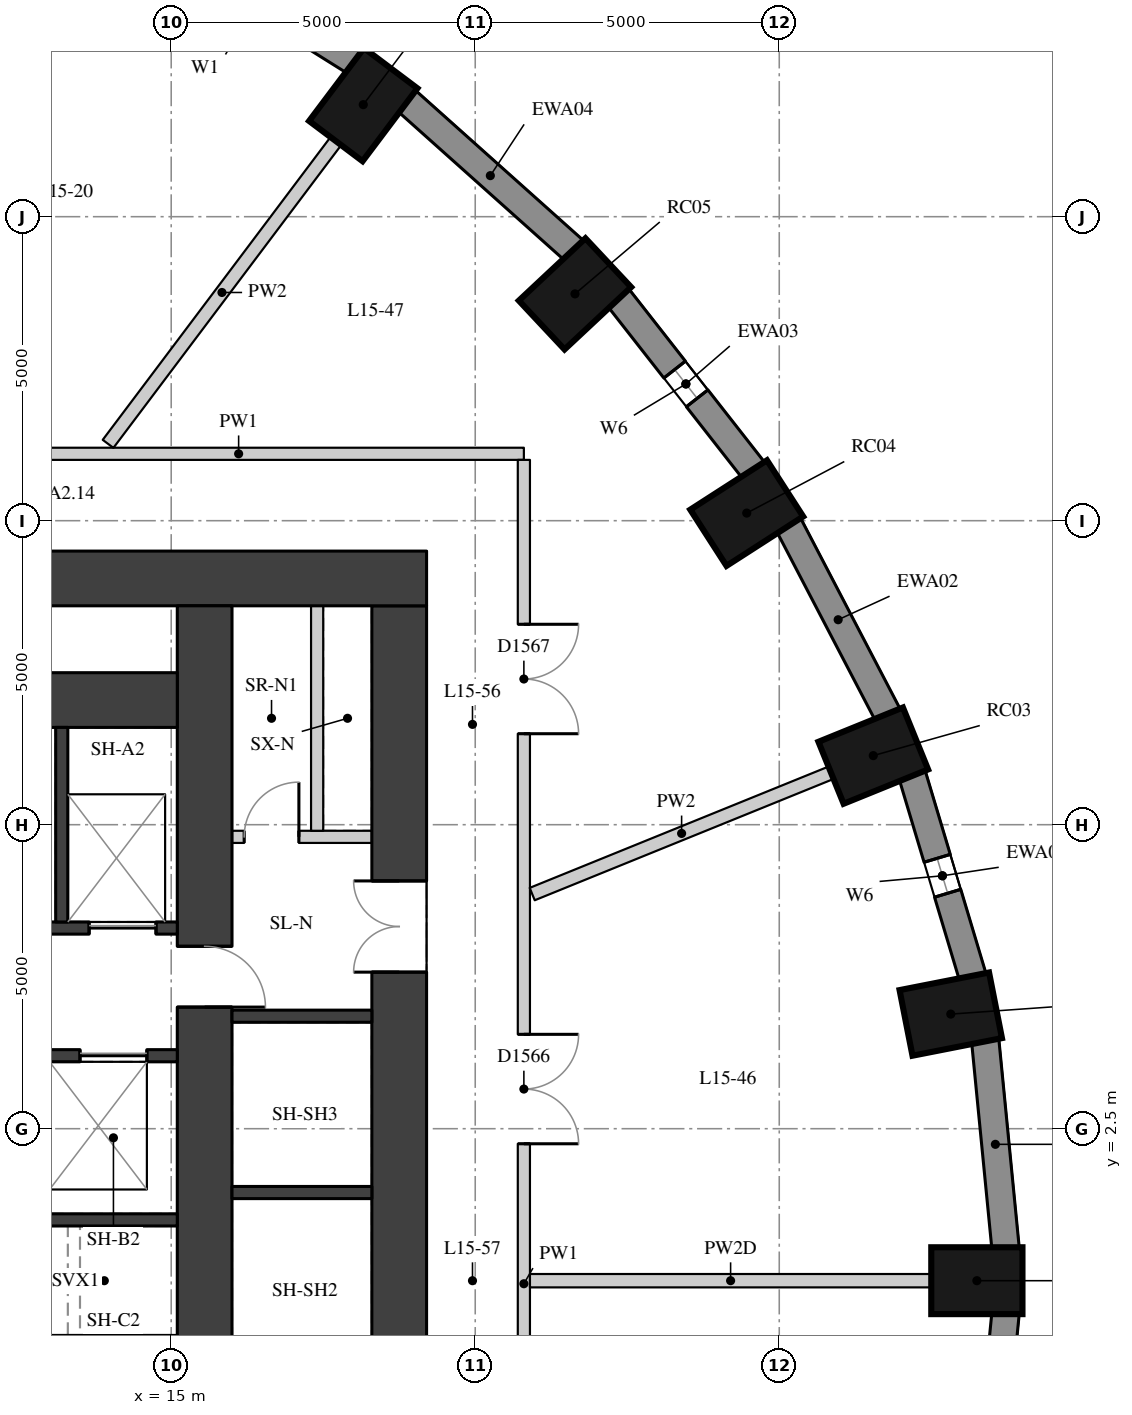
"""IFC4 building model, lengths in metres.
Left out: names, types, materials, properties, quantities, classifications, styles, units other than length and angle.
Written with IfcOpenShell. Run it as: python <this file> out.ifc"""

import sys

from ifc_helpers import new_model, si_unit, direction, frame, frame_2d, origin, origin_2d, place, context, subcontext, project, spatial, rectangle, extrude, element, fill, save


model = new_model("IFC4")
c1 = context("Model", 3, precision=1e-05, world=origin(), true_north=direction((0.0, 1.0)))
c2 = subcontext(c1, "Body", "Model", "MODEL_VIEW")
j1 = project(units=[si_unit("LENGTHUNIT", "METRE"), si_unit("PLANEANGLEUNIT", "RADIAN")], contexts=[c1])
p1 = place(None, origin())
s1 = spatial("IfcSite", under=j1, at=p1, CompositionType="ELEMENT")
p2 = place(p1, origin())
s2 = spatial("IfcBuilding", under=s1, at=p2, CompositionType="ELEMENT")
p3 = place(p2, frame((0.0, 0.0, 58.0)))
s3 = spatial("IfcBuildingStorey", under=s2, at=p3, CompositionType="ELEMENT", Elevation=58.0)
for number, where, z_axis, x_axis in (
    (1, (28.25, 0.0, 0.0), (0.0, 0.0, 1.0), (1.0, 0.0, 0.0)),
    (2, (27.821, 4.385, 0.0), (0.0, 0.0, 1.0), (0.981, 0.193, 0.0)),
    (3, (26.546, 8.636, 0.0), (0.0, 0.0, 1.0), (0.927, 0.376, 0.0)),
    (4, (24.465, 12.625, 0.0), (0.0, 0.0, 1.0), (0.841, 0.541, 0.0)),
    (5, (21.641, 16.23, 0.0), (0.0, 0.0, 1.0), (0.73, 0.683, 0.0)),
    (6, (18.159, 19.343, 0.0), (0.0, 0.0, 1.0), (0.601, 0.799, 0.0)),
):
    element("IfcColumn", number, at=place(p3, frame(where, z_axis=z_axis, x_axis=x_axis)), inside=s3, PredefinedType="COLUMN", context=c2, shape_type="SweptSolid", body=[
        extrude(rectangle(XDim=1.5, YDim=1.1, at=origin_2d()), origin(), (0.0, 0.0, 1.0), 3.3),
    ])
p4 = place(p3, frame((28.722, 0.53, 0.0), z_axis=(0.0, 0.0, 1.0), x_axis=(-0.097389581596, 0.995246336038, 0.0)))
e7 = element("IfcWall", 7, at=p4, inside=s3, PredefinedType="SOLIDWALL", context=c2, shape_type="SweptSolid", body=[
    extrude(rectangle(XDim=3.442, YDim=0.45, at=frame_2d((1.721, 0.0))), origin(), (0.0, 0.0, 1.0), 3.02),
])
p5 = place(p3, frame((28.182, 4.996, 0.0), z_axis=(0.0, 0.0, 1.0), x_axis=(-0.287064133733, 0.957911364963, 0.0)))
e8 = element("IfcWall", 8, at=p5, inside=s3, PredefinedType="SOLIDWALL", context=c2, shape_type="SweptSolid", body=[
    extrude(rectangle(XDim=3.473, YDim=0.45, at=frame_2d((1.737, 0.0))), origin(), (0.0, 0.0, 1.0), 3.02),
])
p6 = place(p5, frame((1.437, 0.0, 0.4)))
e9 = element("IfcOpeningElement", 9, at=p6, cuts=e8, PredefinedType="OPENING", context=c2, shape_type="SweptSolid", body=[
    extrude(rectangle(XDim=0.6, YDim=1.75, at=frame_2d((0.3, 0.875))), frame((0.0, 0.235, 0.0), z_axis=(0.0, -1.0, 0.0), x_axis=(1.0, 0.0, 0.0)), (0.0, 0.0, 1.0), 0.47),
])
p7 = place(p3, frame((26.786, 9.305, 0.0), z_axis=(0.0, 0.0, 1.0), x_axis=(-0.462492775226, 0.886623050041, 0.0)))
e10 = element("IfcWall", 10, at=p7, inside=s3, PredefinedType="SOLIDWALL", context=c2, shape_type="SweptSolid", body=[
    extrude(rectangle(XDim=3.532, YDim=0.45, at=frame_2d((1.766, 0.0))), origin(), (0.0, 0.0, 1.0), 3.02),
])
p8 = place(p3, frame((24.578, 13.328, 0.0), z_axis=(0.0, 0.0, 1.0), x_axis=(-0.616661975264, 0.787228053529, 0.0)))
e11 = element("IfcWall", 11, at=p8, inside=s3, PredefinedType="SOLIDWALL", context=c2, shape_type="SweptSolid", body=[
    extrude(rectangle(XDim=3.61, YDim=0.45, at=frame_2d((1.805, 0.0))), origin(), (0.0, 0.0, 1.0), 3.02),
])
p9 = place(p8, frame((1.505, 0.0, 0.4)))
e12 = element("IfcOpeningElement", 12, at=p9, cuts=e11, PredefinedType="OPENING", context=c2, shape_type="SweptSolid", body=[
    extrude(rectangle(XDim=0.6, YDim=1.75, at=frame_2d((0.3, 0.875))), frame((0.0, 0.235, 0.0), z_axis=(0.0, -1.0, 0.0), x_axis=(1.0, 0.0, 0.0)), (0.0, 0.0, 1.0), 0.47),
])
p10 = place(p3, frame((21.627, 16.943, 0.0), z_axis=(0.0, 0.0, 1.0), x_axis=(-0.745526233716, 0.66647628228, 0.0)))
e13 = element("IfcWall", 13, at=p10, inside=s3, PredefinedType="SOLIDWALL", context=c2, shape_type="SweptSolid", body=[
    extrude(rectangle(XDim=3.697, YDim=0.45, at=frame_2d((1.848, 0.0))), origin(), (0.0, 0.0, 1.0), 3.02),
])
p11 = place(p3, frame((18.023, 20.044, 0.0), z_axis=(0.0, 0.0, 1.0), x_axis=(-0.847635480093, 0.530579016629, 0.0)))
e14 = element("IfcWall", 14, at=p11, inside=s3, PredefinedType="SOLIDWALL", context=c2, shape_type="SweptSolid", body=[
    extrude(rectangle(XDim=3.782, YDim=0.45, at=frame_2d((1.891, 0.0))), origin(), (0.0, 0.0, 1.0), 3.02),
])
p12 = place(p11, frame((0.791, 0.0, 0.4)))
e15 = element("IfcOpeningElement", 15, at=p12, cuts=e14, PredefinedType="OPENING", context=c2, shape_type="SweptSolid", body=[
    extrude(rectangle(XDim=2.2, YDim=1.75, at=frame_2d((1.1, 0.875))), frame((0.0, 0.235, 0.0), z_axis=(0.0, -1.0, 0.0), x_axis=(1.0, 0.0, 0.0)), (0.0, 0.0, 1.0), 0.47),
])
p13 = place(p3, frame((28.387, -3.956, 0.0), z_axis=(0.0, 0.0, 1.0), x_axis=(0.097389581596, 0.995246336038, 0.0)))
e16 = element("IfcWall", 16, at=p13, inside=s3, PredefinedType="SOLIDWALL", context=c2, shape_type="SweptSolid", body=[
    extrude(rectangle(XDim=3.442, YDim=0.45, at=frame_2d((1.721, 0.0))), origin(), (0.0, 0.0, 1.0), 3.02),
])
p14 = place(p13, frame((1.421, 0.0, 0.4)))
e17 = element("IfcOpeningElement", 17, at=p14, cuts=e16, PredefinedType="OPENING", context=c2, shape_type="SweptSolid", body=[
    extrude(rectangle(XDim=0.6, YDim=1.75, at=frame_2d((0.3, 0.875))), frame((0.0, 0.235, 0.0), z_axis=(0.0, -1.0, 0.0), x_axis=(1.0, 0.0, 0.0)), (0.0, 0.0, 1.0), 0.47),
])
p15 = place(p3, frame((18.75, -11.1, 0.0), z_axis=(0.0, 0.0, 1.0), x_axis=(0.0, 1.0, 0.0)))
e18 = element("IfcWall", 18, at=p15, inside=s3, PredefinedType="SHEAR", context=c2, shape_type="SweptSolid", body=[
    extrude(rectangle(XDim=22.2, YDim=0.9, at=frame_2d((11.1, 0.0))), origin(), (0.0, 0.0, 1.0), 3.02),
])
p16 = place(p15, frame((16.175, 0.0, 0.0)))
e19 = element("IfcOpeningElement", 19, at=p16, cuts=e18, PredefinedType="OPENING", context=c2, shape_type="SweptSolid", body=[
    extrude(rectangle(XDim=1.5, YDim=2.1, at=frame_2d((0.75, 1.05))), frame((0.0, 0.46, 0.0), z_axis=(0.0, -1.0, 0.0), x_axis=(1.0, 0.0, 0.0)), (0.0, 0.0, 1.0), 0.92),
])
p17 = place(p15, frame((5.025, 0.0, 0.0)))
e20 = element("IfcOpeningElement", 20, at=p17, cuts=e18, PredefinedType="OPENING", context=c2, shape_type="SweptSolid", body=[
    extrude(rectangle(XDim=1.5, YDim=2.1, at=frame_2d((0.75, 1.05))), frame((0.0, 0.46, 0.0), z_axis=(0.0, -1.0, 0.0), x_axis=(1.0, 0.0, 0.0)), (0.0, 0.0, 1.0), 0.92),
])
p18 = place(p3, frame((4.0, 11.55, 0.0), z_axis=(0.0, 0.0, 1.0), x_axis=(1.0, 0.0, 0.0)))
e21 = element("IfcWall", 21, at=p18, inside=s3, PredefinedType="SHEAR", context=c2, shape_type="SweptSolid", body=[
    extrude(rectangle(XDim=15.2, YDim=0.9, at=frame_2d((7.6, 0.0))), origin(), (0.0, 0.0, 1.0), 3.02),
])
p19 = place(p3, frame((15.55, -11.1, 0.0), z_axis=(0.0, 0.0, 1.0), x_axis=(0.0, 1.0, 0.0)))
e22 = element("IfcWall", 22, at=p19, inside=s3, PredefinedType="SHEAR", context=c2, shape_type="SweptSolid", body=[
    extrude(rectangle(XDim=22.2, YDim=0.9, at=frame_2d((11.1, 0.0))), origin(), (0.0, 0.0, 1.0), 3.02),
])
p20 = place(p19, frame((15.6, 0.0, 0.0)))
e23 = element("IfcOpeningElement", 23, at=p20, cuts=e22, PredefinedType="OPENING", context=c2, shape_type="SweptSolid", body=[
    extrude(rectangle(XDim=1.0, YDim=2.1, at=frame_2d((0.5, 1.05))), frame((0.0, 0.46, 0.0), z_axis=(0.0, -1.0, 0.0), x_axis=(1.0, 0.0, 0.0)), (0.0, 0.0, 1.0), 0.92),
])
p21 = place(p19, frame((5.6, 0.0, 0.0)))
e24 = element("IfcOpeningElement", 24, at=p21, cuts=e22, PredefinedType="OPENING", context=c2, shape_type="SweptSolid", body=[
    extrude(rectangle(XDim=1.0, YDim=2.1, at=frame_2d((0.5, 1.05))), frame((0.0, 0.46, 0.0), z_axis=(0.0, -1.0, 0.0), x_axis=(1.0, 0.0, 0.0)), (0.0, 0.0, 1.0), 0.92),
])
p22 = place(p3, frame((4.9, 9.55, 0.0), z_axis=(0.0, 0.0, 1.0), x_axis=(1.0, 0.0, 0.0)))
e25 = element("IfcWall", 25, at=p22, inside=s3, PredefinedType="SHEAR", context=c2, shape_type="SweptSolid", body=[
    extrude(rectangle(XDim=10.2, YDim=0.9, at=frame_2d((5.1, 0.0))), origin(), (0.0, 0.0, 1.0), 3.02),
])
p23 = place(p3, frame((4.9, 5.8, 0.0), z_axis=(0.0, 0.0, 1.0), x_axis=(1.0, 0.0, 0.0)))
e26 = element("IfcWall", 26, at=p23, inside=s3, PredefinedType="SHEAR", context=c2, shape_type="SweptSolid", body=[
    extrude(rectangle(XDim=10.2, YDim=0.2, at=frame_2d((5.1, 0.0))), origin(), (0.0, 0.0, 1.0), 3.02),
])
p24 = place(p23, frame((6.75, 0.0, 0.0)))
e27 = element("IfcOpeningElement", 27, at=p24, cuts=e26, PredefinedType="OPENING", context=c2, shape_type="SweptSolid", body=[
    extrude(rectangle(XDim=1.1, YDim=2.1, at=frame_2d((0.55, 1.05))), frame((0.0, 0.11, 0.0), z_axis=(0.0, -1.0, 0.0), x_axis=(1.0, 0.0, 0.0)), (0.0, 0.0, 1.0), 0.22),
])
p25 = place(p23, frame((8.75, 0.0, 0.0)))
e28 = element("IfcOpeningElement", 28, at=p25, cuts=e26, PredefinedType="OPENING", context=c2, shape_type="SweptSolid", body=[
    extrude(rectangle(XDim=1.1, YDim=2.1, at=frame_2d((0.55, 1.05))), frame((0.0, 0.11, 0.0), z_axis=(0.0, -1.0, 0.0), x_axis=(1.0, 0.0, 0.0)), (0.0, 0.0, 1.0), 0.22),
])
p26 = place(p3, frame((4.9, 3.7, 0.0), z_axis=(0.0, 0.0, 1.0), x_axis=(1.0, 0.0, 0.0)))
e29 = element("IfcWall", 29, at=p26, inside=s3, PredefinedType="SHEAR", context=c2, shape_type="SweptSolid", body=[
    extrude(rectangle(XDim=10.2, YDim=0.2, at=frame_2d((5.1, 0.0))), origin(), (0.0, 0.0, 1.0), 3.02),
])
p27 = place(p26, frame((6.3, 0.0, 0.0)))
e30 = element("IfcOpeningElement", 30, at=p27, cuts=e29, PredefinedType="OPENING", context=c2, shape_type="SweptSolid", body=[
    extrude(rectangle(XDim=1.1, YDim=2.1, at=frame_2d((0.55, 1.05))), frame((0.0, 0.11, 0.0), z_axis=(0.0, -1.0, 0.0), x_axis=(1.0, 0.0, 0.0)), (0.0, 0.0, 1.0), 0.22),
])
p28 = place(p26, frame((8.6, 0.0, 0.0)))
e31 = element("IfcOpeningElement", 31, at=p28, cuts=e29, PredefinedType="OPENING", context=c2, shape_type="SweptSolid", body=[
    extrude(rectangle(XDim=1.1, YDim=2.1, at=frame_2d((0.55, 1.05))), frame((0.0, 0.11, 0.0), z_axis=(0.0, -1.0, 0.0), x_axis=(1.0, 0.0, 0.0)), (0.0, 0.0, 1.0), 0.22),
])
p29 = place(p3, frame((4.9, 1.0, 0.0), z_axis=(0.0, 0.0, 1.0), x_axis=(1.0, 0.0, 0.0)))
e32 = element("IfcWall", 32, at=p29, inside=s3, PredefinedType="SHEAR", context=c2, shape_type="SweptSolid", body=[
    extrude(rectangle(XDim=10.2, YDim=0.2, at=frame_2d((5.1, 0.0))), origin(), (0.0, 0.0, 1.0), 3.02),
])
p30 = place(p3, frame((13.2, 5.9, 0.0), z_axis=(0.0, 0.0, 1.0), x_axis=(0.0, 1.0, 0.0)))
e33 = element("IfcWall", 33, at=p30, inside=s3, PredefinedType="SHEAR", context=c2, shape_type="SweptSolid", body=[
    extrude(rectangle(XDim=3.2, YDim=0.2, at=frame_2d((1.6, 0.0))), origin(), (0.0, 0.0, 1.0), 3.02),
])
for number, where, z_axis, x_axis in (
    (34, (16.0, 1.45, 0.0), (0.0, 0.0, 1.0), (1.0, 0.0, 0.0)),
    (35, (16.0, 4.35, 0.0), (0.0, 0.0, 1.0), (1.0, 0.0, 0.0)),
):
    element("IfcWall", number, at=place(p3, frame(where, z_axis=z_axis, x_axis=x_axis)), inside=s3, PredefinedType="SHEAR", context=c2, shape_type="SweptSolid", body=[
        extrude(rectangle(XDim=2.3, YDim=0.2, at=frame_2d((1.15, 0.0))), origin(), (0.0, 0.0, 1.0), 3.02),
    ])
p31 = place(p3, frame((16.0, 7.3, 0.0), z_axis=(0.0, 0.0, 1.0), x_axis=(1.0, 0.0, 0.0)))
e36 = element("IfcWall", 36, at=p31, inside=s3, PredefinedType="PARTITIONING", context=c2, shape_type="SweptSolid", body=[
    extrude(rectangle(XDim=2.3, YDim=0.2, at=frame_2d((1.15, 0.0))), origin(), (0.0, 0.0, 1.0), 3.02),
])
p32 = place(p31, frame((0.2, 0.0, 0.0)))
e37 = element("IfcOpeningElement", 37, at=p32, cuts=e36, PredefinedType="OPENING", context=c2, shape_type="SweptSolid", body=[
    extrude(rectangle(XDim=0.9, YDim=2.1, at=frame_2d((0.45, 1.05))), frame((0.0, 0.11, 0.0), z_axis=(0.0, -1.0, 0.0), x_axis=(1.0, 0.0, 0.0)), (0.0, 0.0, 1.0), 0.22),
])
p33 = place(p3, frame((17.4, 7.4, 0.0), z_axis=(0.0, 0.0, 1.0), x_axis=(0.0, 1.0, 0.0)))
e38 = element("IfcWall", 38, at=p33, inside=s3, PredefinedType="PARTITIONING", context=c2, shape_type="SweptSolid", body=[
    extrude(rectangle(XDim=3.7, YDim=0.2, at=frame_2d((1.85, 0.0))), origin(), (0.0, 0.0, 1.0), 3.02),
])
p34 = place(p3, frame((11.418, 13.6, 0.0), z_axis=(0.0, 0.0, 1.0), x_axis=(1.0, 0.0, 0.0)))
e39 = element("IfcWall", 39, at=p34, inside=s3, PredefinedType="PARTITIONING", context=c2, shape_type="SweptSolid", body=[
    extrude(rectangle(XDim=9.382, YDim=0.2, at=frame_2d((4.691, 0.0))), origin(), (0.0, 0.0, 1.0), 3.02),
])
p35 = place(p3, frame((20.8, 13.5, 0.0), z_axis=(0.0, 0.0, 1.0), x_axis=(0.0, -1.0, 0.0)))
e40 = element("IfcWall", 40, at=p35, inside=s3, PredefinedType="PARTITIONING", context=c2, shape_type="SweptSolid", body=[
    extrude(rectangle(XDim=27.1, YDim=0.2, at=frame_2d((13.55, 0.0))), origin(), (0.0, 0.0, 1.0), 3.02),
])
p36 = place(p35, frame((17.733, 0.0, 0.0)))
e41 = element("IfcOpeningElement", 41, at=p36, cuts=e40, PredefinedType="OPENING", context=c2, shape_type="SweptSolid", body=[
    extrude(rectangle(XDim=1.8, YDim=2.1, at=frame_2d((0.9, 1.05))), frame((0.0, 0.11, 0.0), z_axis=(0.0, -1.0, 0.0), x_axis=(1.0, 0.0, 0.0)), (0.0, 0.0, 1.0), 0.22),
])
p37 = place(p35, frame((9.448, 0.0, 0.0)))
e42 = element("IfcOpeningElement", 42, at=p37, cuts=e40, PredefinedType="OPENING", context=c2, shape_type="SweptSolid", body=[
    extrude(rectangle(XDim=1.8, YDim=2.1, at=frame_2d((0.9, 1.05))), frame((0.0, 0.11, 0.0), z_axis=(0.0, -1.0, 0.0), x_axis=(1.0, 0.0, 0.0)), (0.0, 0.0, 1.0), 0.22),
])
p38 = place(p35, frame((2.704, 0.0, 0.0)))
e43 = element("IfcOpeningElement", 43, at=p38, cuts=e40, PredefinedType="OPENING", context=c2, shape_type="SweptSolid", body=[
    extrude(rectangle(XDim=1.8, YDim=2.1, at=frame_2d((0.9, 1.05))), frame((0.0, 0.11, 0.0), z_axis=(0.0, -1.0, 0.0), x_axis=(1.0, 0.0, 0.0)), (0.0, 0.0, 1.0), 0.22),
])
p39 = place(p3, frame((27.5, 0.0, 0.0), z_axis=(0.0, 0.0, 1.0), x_axis=(-1.0, 0.0, 0.0)))
e44 = element("IfcWall", 44, at=p39, inside=s3, PredefinedType="PARTITIONING", context=c2, shape_type="SweptSolid", body=[
    extrude(rectangle(XDim=6.6, YDim=0.22, at=frame_2d((3.3, 0.0))), origin(), (0.0, 0.0, 1.0), 2.47),
])
p40 = place(p3, frame((25.851, 8.354, 0.0), z_axis=(0.0, 0.0, 1.0), x_axis=(-0.926546814299, -0.376179479653, 0.0)))
e45 = element("IfcWall", 45, at=p40, inside=s3, PredefinedType="PARTITIONING", context=c2, shape_type="SweptSolid", body=[
    extrude(rectangle(XDim=5.304, YDim=0.22, at=frame_2d((2.652, 0.0))), origin(), (0.0, 0.0, 1.0), 3.02),
])
p41 = place(p3, frame((17.708, 18.743, 0.0), z_axis=(0.0, 0.0, 1.0), x_axis=(-0.601177883261, -0.799115231164, 0.0)))
e46 = element("IfcWall", 46, at=p41, inside=s3, PredefinedType="PARTITIONING", context=c2, shape_type="SweptSolid", body=[
    extrude(rectangle(XDim=6.231, YDim=0.22, at=frame_2d((3.116, 0.0))), origin(), (0.0, 0.0, 1.0), 3.02),
])
p42 = place(p6, origin())
e47 = element("IfcWindow", 47, at=p42, inside=s3, PartitioningType="SINGLE_PANEL", PredefinedType="WINDOW", context=c2, shape_type="SweptSolid", body=[
    extrude(rectangle(XDim=0.6, YDim=1.75, at=frame_2d((0.3, 0.875))), frame((0.0, 0.035, 0.0), z_axis=(0.0, -1.0, 0.0), x_axis=(1.0, 0.0, 0.0)), (0.0, 0.0, 1.0), 0.06),
])
fill(e9, e47)
p43 = place(p9, origin())
e48 = element("IfcWindow", 48, at=p43, inside=s3, PartitioningType="SINGLE_PANEL", PredefinedType="WINDOW", context=c2, shape_type="SweptSolid", body=[
    extrude(rectangle(XDim=0.6, YDim=1.75, at=frame_2d((0.3, 0.875))), frame((0.0, 0.035, 0.0), z_axis=(0.0, -1.0, 0.0), x_axis=(1.0, 0.0, 0.0)), (0.0, 0.0, 1.0), 0.06),
])
fill(e12, e48)
p44 = place(p16, origin())
e49 = element("IfcDoor", 49, at=p44, inside=s3, OperationType="DOUBLE_DOOR_SINGLE_SWING", PredefinedType="DOOR", context=c2, shape_type="SweptSolid", body=[
    extrude(rectangle(XDim=1.5, YDim=2.1, at=frame_2d((0.75, 1.05))), frame((0.0, 0.025, 0.0), z_axis=(0.0, -1.0, 0.0), x_axis=(1.0, 0.0, 0.0)), (0.0, 0.0, 1.0), 0.05),
])
fill(e19, e49)
p45 = place(p25, origin())
e50 = element("IfcDoor", 50, at=p45, inside=s3, OperationType="DOUBLE_DOOR_SLIDING", PredefinedType="DOOR", context=c2, shape_type="SweptSolid", body=[
    extrude(rectangle(XDim=1.1, YDim=2.1, at=frame_2d((0.55, 1.05))), frame((0.0, 0.025, 0.0), z_axis=(0.0, -1.0, 0.0), x_axis=(1.0, 0.0, 0.0)), (0.0, 0.0, 1.0), 0.05),
])
fill(e28, e50)
p46 = place(p28, origin())
e51 = element("IfcDoor", 51, at=p46, inside=s3, OperationType="DOUBLE_DOOR_SLIDING", PredefinedType="DOOR", context=c2, shape_type="SweptSolid", body=[
    extrude(rectangle(XDim=1.1, YDim=2.1, at=frame_2d((0.55, 1.05))), frame((0.0, 0.025, 0.0), z_axis=(0.0, -1.0, 0.0), x_axis=(1.0, 0.0, 0.0)), (0.0, 0.0, 1.0), 0.05),
])
fill(e31, e51)
p47 = place(p20, origin())
e52 = element("IfcDoor", 52, at=p47, inside=s3, OperationType="SINGLE_SWING_RIGHT", PredefinedType="DOOR", context=c2, shape_type="SweptSolid", body=[
    extrude(rectangle(XDim=1.0, YDim=2.1, at=frame_2d((0.5, 1.05))), frame((0.0, 0.025, 0.0), z_axis=(0.0, -1.0, 0.0), x_axis=(1.0, 0.0, 0.0)), (0.0, 0.0, 1.0), 0.05),
])
fill(e23, e52)
p48 = place(p32, origin())
e53 = element("IfcDoor", 53, at=p48, inside=s3, OperationType="SINGLE_SWING_RIGHT", PredefinedType="DOOR", context=c2, shape_type="SweptSolid", body=[
    extrude(rectangle(XDim=0.9, YDim=2.1, at=frame_2d((0.45, 1.05))), frame((0.0, 0.025, 0.0), z_axis=(0.0, -1.0, 0.0), x_axis=(1.0, 0.0, 0.0)), (0.0, 0.0, 1.0), 0.05),
])
fill(e37, e53)
p49 = place(p37, origin())
e54 = element("IfcDoor", 54, at=p49, inside=s3, OperationType="DOUBLE_DOOR_SINGLE_SWING", PredefinedType="DOOR", context=c2, shape_type="SweptSolid", body=[
    extrude(rectangle(XDim=1.8, YDim=2.1, at=frame_2d((0.9, 1.05))), frame((0.0, 0.025, 0.0), z_axis=(0.0, -1.0, 0.0), x_axis=(1.0, 0.0, 0.0)), (0.0, 0.0, 1.0), 0.05),
])
fill(e42, e54)
p50 = place(p38, origin())
e55 = element("IfcDoor", 55, at=p50, inside=s3, OperationType="DOUBLE_DOOR_SINGLE_SWING", PredefinedType="DOOR", context=c2, shape_type="SweptSolid", body=[
    extrude(rectangle(XDim=1.8, YDim=2.1, at=frame_2d((0.9, 1.05))), frame((0.0, 0.025, 0.0), z_axis=(0.0, -1.0, 0.0), x_axis=(1.0, 0.0, 0.0)), (0.0, 0.0, 1.0), 0.05),
])
fill(e43, e55)
save(model, sys.argv[1])
